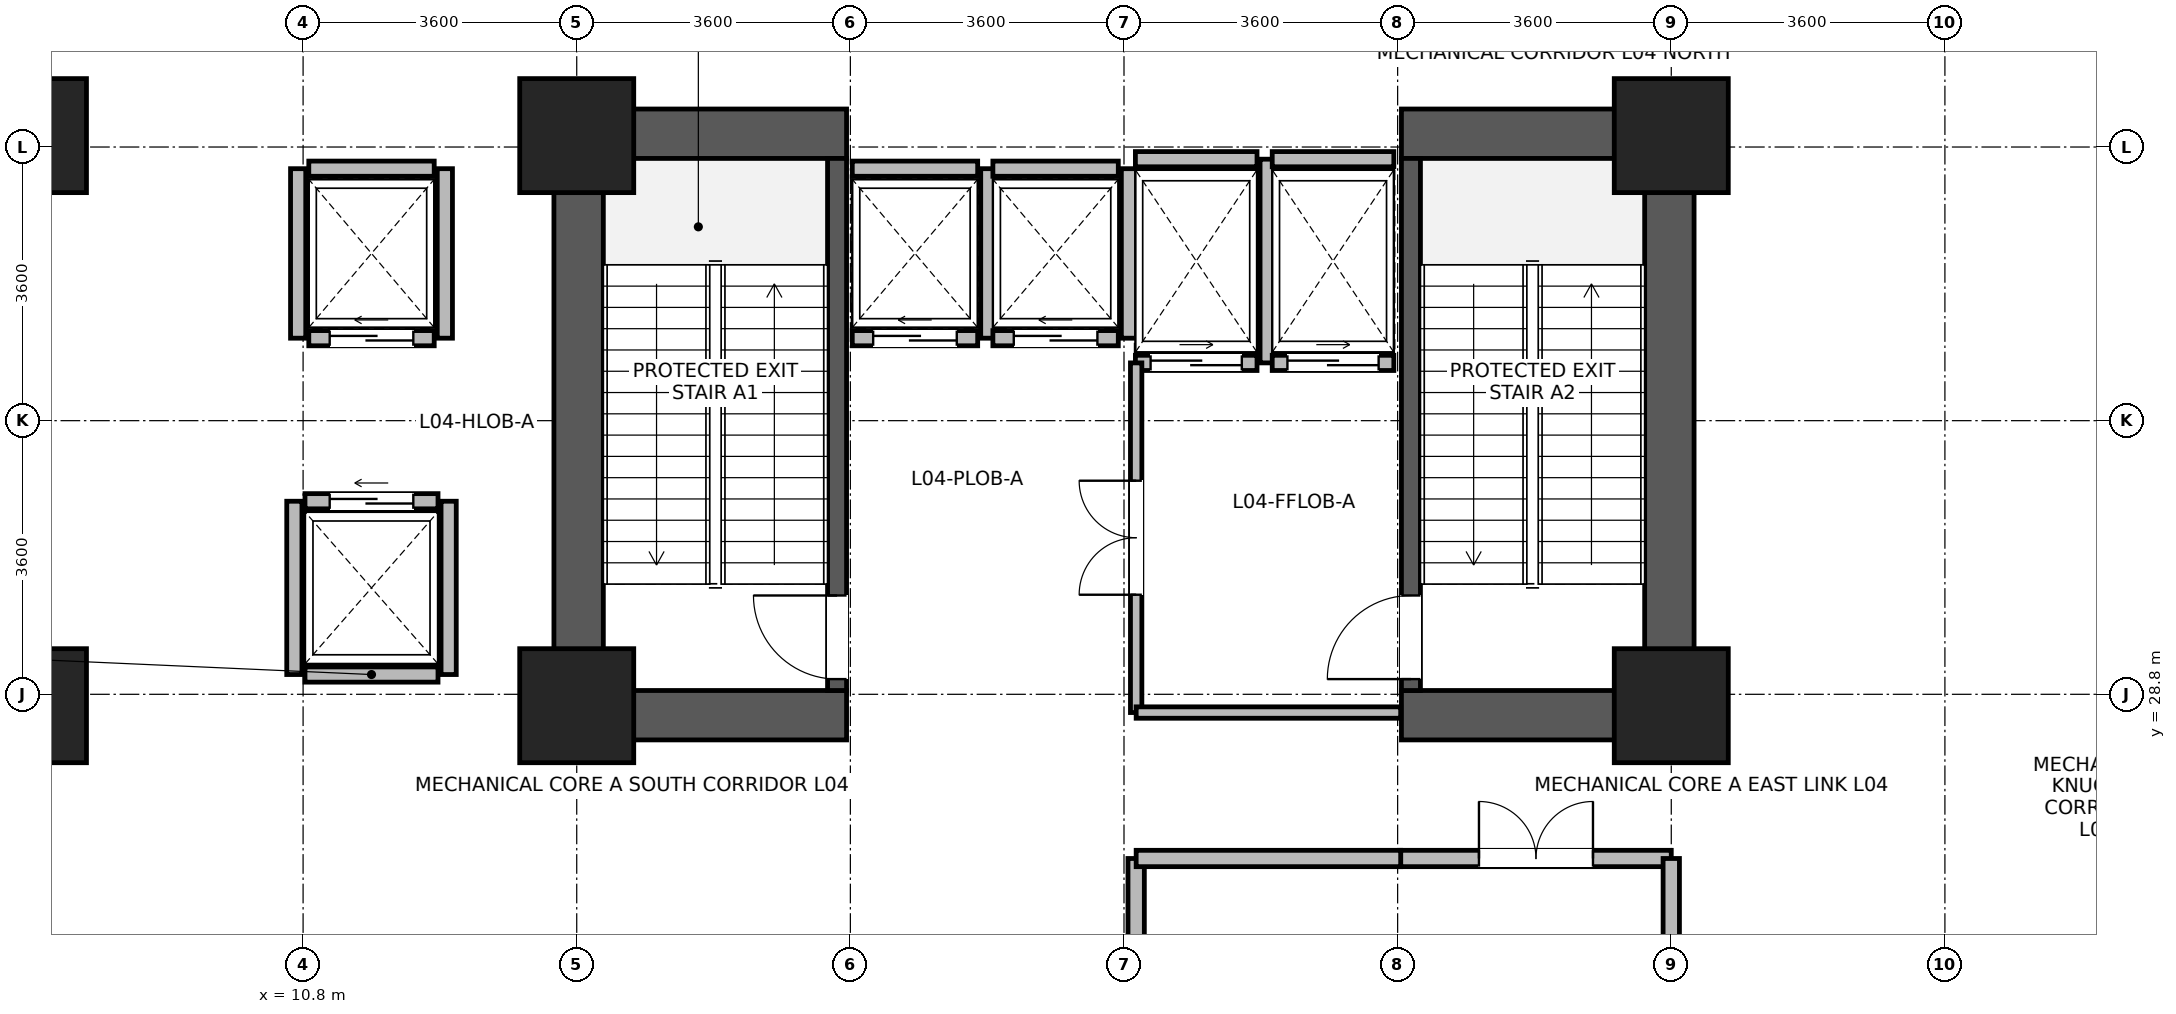
"""IFC4 building model, lengths in metres.
Left out: names, types, materials, properties, quantities, classifications, styles, units other than length and angle.
Written with IfcOpenShell. Run it as: python <this file> out.ifc"""

import sys

from ifc_helpers import new_model, si_unit, direction, frame, frame_2d, origin, origin_2d, place, context, subcontext, project, spatial, rectangle, extrude, source, transform, mapped, element, fill, save


model = new_model("IFC4")
c1 = context("Model", 3, precision=1e-05, world=origin(), true_north=direction((0.0, 1.0)))
c2 = subcontext(c1, "Body", "Model", "MODEL_VIEW")
j1 = project(units=[si_unit("LENGTHUNIT", "METRE"), si_unit("PLANEANGLEUNIT", "RADIAN")], contexts=[c1])
p1 = place(None, origin())
s1 = spatial("IfcSite", under=j1, at=p1, CompositionType="ELEMENT")
p2 = place(p1, origin())
s2 = spatial("IfcBuilding", under=s1, at=p2, CompositionType="ELEMENT")
p3 = place(p2, frame((0.0, 0.0, 19.8)))
s3 = spatial("IfcBuildingStorey", under=s2, at=p3, CompositionType="ELEMENT", Elevation=19.8)
for number, where, z_axis, x_axis in (
    (1, (14.425, 28.2, 0.0), (0.0, 0.0, 1.0), (0.0, 1.0, 0.0)),
    (2, (28.775, 28.2, 0.0), (0.0, 0.0, 1.0), (0.0, 1.0, 0.0)),
):
    element("IfcWall", number, at=place(p3, frame(where, z_axis=z_axis, x_axis=x_axis)), inside=s3, PredefinedType="SHEAR", context=c2, shape_type="SweptSolid", body=[
        extrude(rectangle(XDim=8.3, YDim=0.65, at=frame_2d((4.15, 0.0))), origin(), (0.0, 0.0, 1.0), 5.08),
    ])
for number, where, z_axis, x_axis in (
    (3, (14.75, 28.525, 0.0), (0.0, 0.0, 1.0), (1.0, 0.0, 0.0)),
    (4, (25.25, 28.525, 0.0), (0.0, 0.0, 1.0), (1.0, 0.0, 0.0)),
    (5, (14.75, 36.175, 0.0), (0.0, 0.0, 1.0), (1.0, 0.0, 0.0)),
    (6, (25.25, 36.175, 0.0), (0.0, 0.0, 1.0), (1.0, 0.0, 0.0)),
):
    element("IfcWall", number, at=place(p3, frame(where, z_axis=z_axis, x_axis=x_axis)), inside=s3, PredefinedType="SHEAR", context=c2, shape_type="SweptSolid", body=[
        extrude(rectangle(XDim=3.2, YDim=0.65, at=frame_2d((1.6, 0.0))), origin(), (0.0, 0.0, 1.0), 5.08),
    ])
p4 = place(p3, frame((17.825, 28.85, 0.0), z_axis=(0.0, 0.0, 1.0), x_axis=(0.0, 1.0, 0.0)))
e7 = element("IfcWall", 7, at=p4, inside=s3, PredefinedType="SHEAR", context=c2, shape_type="SweptSolid", body=[
    extrude(rectangle(XDim=7.0, YDim=0.25, at=frame_2d((3.5, 0.0))), origin(), (0.0, 0.0, 1.0), 5.08),
])
p5 = place(p4, frame((0.15, 0.0, 0.0)))
e8 = element("IfcOpeningElement", 8, at=p5, cuts=e7, PredefinedType="OPENING", context=c2, shape_type="SweptSolid", body=[
    extrude(rectangle(XDim=1.1, YDim=2.08, at=frame_2d((0.55, 1.04))), frame((0.0, 0.135, 0.0), z_axis=(0.0, -1.0, 0.0), x_axis=(1.0, 0.0, 0.0)), (0.0, 0.0, 1.0), 0.27),
])
p6 = place(p3, frame((25.375, 28.85, 0.0), z_axis=(0.0, 0.0, 1.0), x_axis=(0.0, 1.0, 0.0)))
e9 = element("IfcWall", 9, at=p6, inside=s3, PredefinedType="SHEAR", context=c2, shape_type="SweptSolid", body=[
    extrude(rectangle(XDim=7.0, YDim=0.25, at=frame_2d((3.5, 0.0))), origin(), (0.0, 0.0, 1.0), 5.08),
])
p7 = place(p6, frame((0.15, 0.0, 0.0)))
e10 = element("IfcOpeningElement", 10, at=p7, cuts=e9, PredefinedType="OPENING", context=c2, shape_type="SweptSolid", body=[
    extrude(rectangle(XDim=1.1, YDim=2.08, at=frame_2d((0.55, 1.04))), frame((0.0, 0.135, 0.0), z_axis=(0.0, -1.0, 0.0), x_axis=(1.0, 0.0, 0.0)), (0.0, 0.0, 1.0), 0.27),
])
m1 = source(origin(), c2, "Body", "SweptSolid", [
    extrude(rectangle(XDim=1.5, YDim=1.5, at=origin_2d()), origin(), (0.0, 0.0, 1.0), 5.5),
])
for number, where, z_axis, x_axis in (
    (11, (7.2, 28.65, 0.0), (0.0, 0.0, 1.0), (1.0, 0.0, 0.0)),
    (12, (7.2, 36.15, 0.0), (0.0, 0.0, 1.0), (1.0, 0.0, 0.0)),
    (13, (14.4, 28.65, 0.0), (0.0, 0.0, 1.0), (1.0, 0.0, 0.0)),
    (14, (14.4, 36.15, 0.0), (0.0, 0.0, 1.0), (1.0, 0.0, 0.0)),
    (15, (28.8, 28.65, 0.0), (0.0, 0.0, 1.0), (1.0, 0.0, 0.0)),
    (16, (28.8, 36.15, 0.0), (0.0, 0.0, 1.0), (1.0, 0.0, 0.0)),
):
    element("IfcColumn", number, at=place(p3, frame(where, z_axis=z_axis, x_axis=x_axis)), inside=s3, PredefinedType="COLUMN", context=c2, shape_type="MappedRepresentation", body=[
        mapped(m1, transform((0.0, 0.0, 0.0), x_axis=(1.0, 0.0, 0.0), y_axis=(0.0, 1.0, 0.0), z_axis=(0.0, 0.0, 1.0), scale=1.0)),
    ])
p8 = place(p3, frame((18.025, 33.485, 0.0), z_axis=(0.0, 0.0, 1.0), x_axis=(1.0, 0.0, 0.0)))
e17 = element("IfcWall", 17, at=p8, inside=s3, PredefinedType="PARTITIONING", context=c2, shape_type="SweptSolid", body=[
    extrude(rectangle(XDim=1.65, YDim=0.2, at=frame_2d((0.825, 0.0))), origin(), (0.0, 0.0, 1.0), 5.06),
])
p9 = place(p8, frame((0.275, 0.0, 0.0)))
e18 = element("IfcOpeningElement", 18, at=p9, cuts=e17, PredefinedType="OPENING", context=c2, shape_type="SweptSolid", body=[
    extrude(rectangle(XDim=1.1, YDim=2.12, at=frame_2d((0.55, 1.06))), frame((0.0, 0.11, 0.0), z_axis=(0.0, -1.0, 0.0), x_axis=(1.0, 0.0, 0.0)), (0.0, 0.0, 1.0), 0.22),
])
p10 = place(p3, frame((18.025, 35.715, 0.0), z_axis=(0.0, 0.0, 1.0), x_axis=(1.0, 0.0, 0.0)))
e19 = element("IfcWall", 19, at=p10, inside=s3, PredefinedType="PARTITIONING", context=c2, shape_type="SweptSolid", body=[
    extrude(rectangle(XDim=1.65, YDim=0.2, at=frame_2d((0.825, 0.0))), origin(), (0.0, 0.0, 1.0), 5.06),
])
p11 = place(p3, frame((19.815, 33.485, 0.0), z_axis=(0.0, 0.0, 1.0), x_axis=(0.0, 1.0, 0.0)))
e20 = element("IfcWall", 20, at=p11, inside=s3, PredefinedType="PARTITIONING", context=c2, shape_type="SweptSolid", body=[
    extrude(rectangle(XDim=2.23, YDim=0.2, at=frame_2d((1.115, 0.0))), origin(), (0.0, 0.0, 1.0), 5.06),
])
p12 = place(p3, frame((19.875, 33.485, 0.0), z_axis=(0.0, 0.0, 1.0), x_axis=(1.0, 0.0, 0.0)))
e21 = element("IfcWall", 21, at=p12, inside=s3, PredefinedType="PARTITIONING", context=c2, shape_type="SweptSolid", body=[
    extrude(rectangle(XDim=1.65, YDim=0.2, at=frame_2d((0.825, 0.0))), origin(), (0.0, 0.0, 1.0), 5.06),
])
p13 = place(p12, frame((0.275, 0.0, 0.0)))
e22 = element("IfcOpeningElement", 22, at=p13, cuts=e21, PredefinedType="OPENING", context=c2, shape_type="SweptSolid", body=[
    extrude(rectangle(XDim=1.1, YDim=2.12, at=frame_2d((0.55, 1.06))), frame((0.0, 0.11, 0.0), z_axis=(0.0, -1.0, 0.0), x_axis=(1.0, 0.0, 0.0)), (0.0, 0.0, 1.0), 0.22),
])
p14 = place(p3, frame((19.875, 35.715, 0.0), z_axis=(0.0, 0.0, 1.0), x_axis=(1.0, 0.0, 0.0)))
e23 = element("IfcWall", 23, at=p14, inside=s3, PredefinedType="PARTITIONING", context=c2, shape_type="SweptSolid", body=[
    extrude(rectangle(XDim=1.65, YDim=0.2, at=frame_2d((0.825, 0.0))), origin(), (0.0, 0.0, 1.0), 5.06),
])
p15 = place(p3, frame((21.665, 33.485, 0.0), z_axis=(0.0, 0.0, 1.0), x_axis=(0.0, 1.0, 0.0)))
e24 = element("IfcWall", 24, at=p15, inside=s3, PredefinedType="PARTITIONING", context=c2, shape_type="SweptSolid", body=[
    extrude(rectangle(XDim=2.23, YDim=0.2, at=frame_2d((1.115, 0.0))), origin(), (0.0, 0.0, 1.0), 5.06),
])
p16 = place(p3, frame((10.825, 29.06, 0.0), z_axis=(0.0, 0.0, 1.0), x_axis=(1.0, 0.0, 0.0)))
e25 = element("IfcWall", 25, at=p16, inside=s3, PredefinedType="PARTITIONING", context=c2, shape_type="SweptSolid", body=[
    extrude(rectangle(XDim=1.75, YDim=0.2, at=frame_2d((0.875, 0.0))), origin(), (0.0, 0.0, 1.0), 5.06),
])
p17 = place(p3, frame((10.825, 31.34, 0.0), z_axis=(0.0, 0.0, 1.0), x_axis=(1.0, 0.0, 0.0)))
e26 = element("IfcWall", 26, at=p17, inside=s3, PredefinedType="PARTITIONING", context=c2, shape_type="SweptSolid", body=[
    extrude(rectangle(XDim=1.75, YDim=0.2, at=frame_2d((0.875, 0.0))), origin(), (0.0, 0.0, 1.0), 5.06),
])
p18 = place(p17, frame((0.325, 0.0, 0.0)))
e27 = element("IfcOpeningElement", 27, at=p18, cuts=e26, PredefinedType="OPENING", context=c2, shape_type="SweptSolid", body=[
    extrude(rectangle(XDim=1.1, YDim=2.12, at=frame_2d((0.55, 1.06))), frame((0.0, 0.11, 0.0), z_axis=(0.0, -1.0, 0.0), x_axis=(1.0, 0.0, 0.0)), (0.0, 0.0, 1.0), 0.22),
])
for number, where, z_axis, x_axis in (
    (28, (10.685, 29.06, 0.0), (0.0, 0.0, 1.0), (0.0, 1.0, 0.0)),
    (29, (12.715, 29.06, 0.0), (0.0, 0.0, 1.0), (0.0, 1.0, 0.0)),
):
    element("IfcWall", number, at=place(p3, frame(where, z_axis=z_axis, x_axis=x_axis)), inside=s3, PredefinedType="PARTITIONING", context=c2, shape_type="SweptSolid", body=[
        extrude(rectangle(XDim=2.28, YDim=0.2, at=frame_2d((1.14, 0.0))), origin(), (0.0, 0.0, 1.0), 5.06),
    ])
p19 = place(p3, frame((10.875, 33.485, 0.0), z_axis=(0.0, 0.0, 1.0), x_axis=(1.0, 0.0, 0.0)))
e30 = element("IfcWall", 30, at=p19, inside=s3, PredefinedType="PARTITIONING", context=c2, shape_type="SweptSolid", body=[
    extrude(rectangle(XDim=1.65, YDim=0.2, at=frame_2d((0.825, 0.0))), origin(), (0.0, 0.0, 1.0), 5.06),
])
p20 = place(p19, frame((0.275, 0.0, 0.0)))
e31 = element("IfcOpeningElement", 31, at=p20, cuts=e30, PredefinedType="OPENING", context=c2, shape_type="SweptSolid", body=[
    extrude(rectangle(XDim=1.1, YDim=2.12, at=frame_2d((0.55, 1.06))), frame((0.0, 0.11, 0.0), z_axis=(0.0, -1.0, 0.0), x_axis=(1.0, 0.0, 0.0)), (0.0, 0.0, 1.0), 0.22),
])
p21 = place(p3, frame((10.875, 35.715, 0.0), z_axis=(0.0, 0.0, 1.0), x_axis=(1.0, 0.0, 0.0)))
e32 = element("IfcWall", 32, at=p21, inside=s3, PredefinedType="PARTITIONING", context=c2, shape_type="SweptSolid", body=[
    extrude(rectangle(XDim=1.65, YDim=0.2, at=frame_2d((0.825, 0.0))), origin(), (0.0, 0.0, 1.0), 5.06),
])
for number, where, z_axis, x_axis in (
    (33, (10.735, 33.485, 0.0), (0.0, 0.0, 1.0), (0.0, 1.0, 0.0)),
    (34, (12.665, 33.485, 0.0), (0.0, 0.0, 1.0), (0.0, 1.0, 0.0)),
):
    element("IfcWall", number, at=place(p3, frame(where, z_axis=z_axis, x_axis=x_axis)), inside=s3, PredefinedType="PARTITIONING", context=c2, shape_type="SweptSolid", body=[
        extrude(rectangle(XDim=2.23, YDim=0.2, at=frame_2d((1.115, 0.0))), origin(), (0.0, 0.0, 1.0), 5.06),
    ])
p22 = place(p3, frame((21.75, 33.16, 0.0), z_axis=(0.0, 0.0, 1.0), x_axis=(1.0, 0.0, 0.0)))
e35 = element("IfcWall", 35, at=p22, inside=s3, PredefinedType="PARTITIONING", context=c2, shape_type="SweptSolid", body=[
    extrude(rectangle(XDim=1.6, YDim=0.2, at=frame_2d((0.8, 0.0))), origin(), (0.0, 0.0, 1.0), 5.06),
])
p23 = place(p22, frame((0.2, 0.0, 0.0)))
e36 = element("IfcOpeningElement", 36, at=p23, cuts=e35, PredefinedType="OPENING", context=c2, shape_type="SweptSolid", body=[
    extrude(rectangle(XDim=1.2, YDim=2.12, at=frame_2d((0.6, 1.06))), frame((0.0, 0.11, 0.0), z_axis=(0.0, -1.0, 0.0), x_axis=(1.0, 0.0, 0.0)), (0.0, 0.0, 1.0), 0.22),
])
p24 = place(p3, frame((21.75, 35.84, 0.0), z_axis=(0.0, 0.0, 1.0), x_axis=(1.0, 0.0, 0.0)))
e37 = element("IfcWall", 37, at=p24, inside=s3, PredefinedType="PARTITIONING", context=c2, shape_type="SweptSolid", body=[
    extrude(rectangle(XDim=1.6, YDim=0.2, at=frame_2d((0.8, 0.0))), origin(), (0.0, 0.0, 1.0), 3.86),
])
p25 = place(p3, frame((23.49, 33.16, 0.0), z_axis=(0.0, 0.0, 1.0), x_axis=(0.0, 1.0, 0.0)))
e38 = element("IfcWall", 38, at=p25, inside=s3, PredefinedType="PARTITIONING", context=c2, shape_type="SweptSolid", body=[
    extrude(rectangle(XDim=2.68, YDim=0.2, at=frame_2d((1.34, 0.0))), origin(), (0.0, 0.0, 1.0), 5.06),
])
p26 = place(p3, frame((23.55, 33.16, 0.0), z_axis=(0.0, 0.0, 1.0), x_axis=(1.0, 0.0, 0.0)))
e39 = element("IfcWall", 39, at=p26, inside=s3, PredefinedType="PARTITIONING", context=c2, shape_type="SweptSolid", body=[
    extrude(rectangle(XDim=1.6, YDim=0.2, at=frame_2d((0.8, 0.0))), origin(), (0.0, 0.0, 1.0), 5.06),
])
p27 = place(p26, frame((0.2, 0.0, 0.0)))
e40 = element("IfcOpeningElement", 40, at=p27, cuts=e39, PredefinedType="OPENING", context=c2, shape_type="SweptSolid", body=[
    extrude(rectangle(XDim=1.2, YDim=2.12, at=frame_2d((0.6, 1.06))), frame((0.0, 0.11, 0.0), z_axis=(0.0, -1.0, 0.0), x_axis=(1.0, 0.0, 0.0)), (0.0, 0.0, 1.0), 0.22),
])
p28 = place(p3, frame((23.55, 35.84, 0.0), z_axis=(0.0, 0.0, 1.0), x_axis=(1.0, 0.0, 0.0)))
e41 = element("IfcWall", 41, at=p28, inside=s3, PredefinedType="PARTITIONING", context=c2, shape_type="SweptSolid", body=[
    extrude(rectangle(XDim=1.6, YDim=0.2, at=frame_2d((0.8, 0.0))), origin(), (0.0, 0.0, 1.0), 3.86),
])
p29 = place(p3, frame((25.24, 26.64, 0.0), z_axis=(0.0, 0.0, 1.0), x_axis=(1.0, 0.0, 0.0)))
e42 = element("IfcWall", 42, at=p29, inside=s3, PredefinedType="PARTITIONING", context=c2, shape_type="SweptSolid", body=[
    extrude(rectangle(XDim=3.56, YDim=0.215, at=frame_2d((1.78, 0.0))), origin(), (0.0, 0.0, 1.0), 5.06),
])
p30 = place(p29, frame((1.03, 0.0, 0.0)))
e43 = element("IfcOpeningElement", 43, at=p30, cuts=e42, PredefinedType="OPENING", context=c2, shape_type="SweptSolid", body=[
    extrude(rectangle(XDim=1.5, YDim=2.1, at=frame_2d((0.75, 1.05))), frame((0.0, 0.118, 0.0), z_axis=(0.0, -1.0, 0.0), x_axis=(1.0, 0.0, 0.0)), (0.0, 0.0, 1.0), 0.235),
])
p31 = place(p3, frame((21.76, 22.35, 0.0), z_axis=(0.0, 0.0, 1.0), x_axis=(0.0, 1.0, 0.0)))
e44 = element("IfcWall", 44, at=p31, inside=s3, PredefinedType="PARTITIONING", context=c2, shape_type="SweptSolid", body=[
    extrude(rectangle(XDim=4.29, YDim=0.215, at=frame_2d((2.145, 0.0))), origin(), (0.0, 0.0, 1.0), 3.46),
])
p32 = place(p3, frame((28.8, 22.35, 0.0), z_axis=(0.0, 0.0, 1.0), x_axis=(0.0, 1.0, 0.0)))
e45 = element("IfcWall", 45, at=p32, inside=s3, PredefinedType="PARTITIONING", context=c2, shape_type="SweptSolid", body=[
    extrude(rectangle(XDim=4.29, YDim=0.215, at=frame_2d((2.145, 0.0))), origin(), (0.0, 0.0, 1.0), 3.26),
])
p33 = place(p3, frame((21.76, 28.56, 0.0), z_axis=(0.0, 0.0, 1.0), x_axis=(0.0, 1.0, 0.0)))
e46 = element("IfcWall", 46, at=p33, inside=s3, PredefinedType="PARTITIONING", context=c2, shape_type="SweptSolid", body=[
    extrude(rectangle(XDim=4.6, YDim=0.15, at=frame_2d((2.3, 0.0))), origin(), (0.0, 0.0, 1.0), 5.06),
])
p34 = place(p33, frame((1.55, 0.0, 0.0)))
e47 = element("IfcOpeningElement", 47, at=p34, cuts=e46, PredefinedType="OPENING", context=c2, shape_type="SweptSolid", body=[
    extrude(rectangle(XDim=1.5, YDim=2.1, at=frame_2d((0.75, 1.05))), frame((0.0, 0.085, 0.0), z_axis=(0.0, -1.0, 0.0), x_axis=(1.0, 0.0, 0.0)), (0.0, 0.0, 1.0), 0.17),
])
p35 = place(p3, frame((21.76, 26.64, 0.0), z_axis=(0.0, 0.0, 1.0), x_axis=(1.0, 0.0, 0.0)))
e48 = element("IfcWall", 48, at=p35, inside=s3, PredefinedType="PARTITIONING", context=c2, shape_type="SweptSolid", body=[
    extrude(rectangle(XDim=3.48, YDim=0.215, at=frame_2d((1.74, 0.0))), origin(), (0.0, 0.0, 1.0), 5.06),
])
p36 = place(p3, frame((21.76, 28.56, 0.0), z_axis=(0.0, 0.0, 1.0), x_axis=(1.0, 0.0, 0.0)))
e49 = element("IfcWall", 49, at=p36, inside=s3, PredefinedType="PARTITIONING", context=c2, shape_type="SweptSolid", body=[
    extrude(rectangle(XDim=3.48, YDim=0.15, at=frame_2d((1.74, 0.0))), origin(), (0.0, 0.0, 1.0), 3.86),
])
p37 = place(p5, origin())
e50 = element("IfcDoor", 50, at=p37, inside=s3, OperationType="SINGLE_SWING_RIGHT", PredefinedType="DOOR", context=c2, shape_type="SweptSolid", body=[
    extrude(rectangle(XDim=1.1, YDim=2.08, at=frame_2d((0.55, 1.04))), frame((0.0, 0.025, 0.0), z_axis=(0.0, -1.0, 0.0), x_axis=(1.0, 0.0, 0.0)), (0.0, 0.0, 1.0), 0.05),
])
fill(e8, e50)
p38 = place(p7, origin())
e51 = element("IfcDoor", 51, at=p38, inside=s3, OperationType="SINGLE_SWING_LEFT", PredefinedType="DOOR", context=c2, shape_type="SweptSolid", body=[
    extrude(rectangle(XDim=1.1, YDim=2.08, at=frame_2d((0.55, 1.04))), frame((0.0, 0.025, 0.0), z_axis=(0.0, -1.0, 0.0), x_axis=(1.0, 0.0, 0.0)), (0.0, 0.0, 1.0), 0.05),
])
fill(e10, e51)
p39 = place(p9, origin())
e52 = element("IfcDoor", 52, at=p39, inside=s3, OperationType="SLIDING_TO_LEFT", PredefinedType="DOOR", context=c2, shape_type="SweptSolid", body=[
    extrude(rectangle(XDim=1.1, YDim=2.12, at=frame_2d((0.55, 1.06))), frame((0.0, 0.025, 0.0), z_axis=(0.0, -1.0, 0.0), x_axis=(1.0, 0.0, 0.0)), (0.0, 0.0, 1.0), 0.05),
])
fill(e18, e52)
p40 = place(p13, origin())
e53 = element("IfcDoor", 53, at=p40, inside=s3, OperationType="SLIDING_TO_LEFT", PredefinedType="DOOR", context=c2, shape_type="SweptSolid", body=[
    extrude(rectangle(XDim=1.1, YDim=2.12, at=frame_2d((0.55, 1.06))), frame((0.0, 0.025, 0.0), z_axis=(0.0, -1.0, 0.0), x_axis=(1.0, 0.0, 0.0)), (0.0, 0.0, 1.0), 0.05),
])
fill(e22, e53)
p41 = place(p18, origin())
e54 = element("IfcDoor", 54, at=p41, inside=s3, OperationType="SLIDING_TO_LEFT", PredefinedType="DOOR", context=c2, shape_type="SweptSolid", body=[
    extrude(rectangle(XDim=1.1, YDim=2.12, at=frame_2d((0.55, 1.06))), frame((0.0, 0.025, 0.0), z_axis=(0.0, -1.0, 0.0), x_axis=(1.0, 0.0, 0.0)), (0.0, 0.0, 1.0), 0.05),
])
fill(e27, e54)
p42 = place(p20, origin())
e55 = element("IfcDoor", 55, at=p42, inside=s3, OperationType="SLIDING_TO_LEFT", PredefinedType="DOOR", context=c2, shape_type="SweptSolid", body=[
    extrude(rectangle(XDim=1.1, YDim=2.12, at=frame_2d((0.55, 1.06))), frame((0.0, 0.025, 0.0), z_axis=(0.0, -1.0, 0.0), x_axis=(1.0, 0.0, 0.0)), (0.0, 0.0, 1.0), 0.05),
])
fill(e31, e55)
p43 = place(p23, origin())
e56 = element("IfcDoor", 56, at=p43, inside=s3, OperationType="SLIDING_TO_RIGHT", PredefinedType="DOOR", context=c2, shape_type="SweptSolid", body=[
    extrude(rectangle(XDim=1.2, YDim=2.12, at=frame_2d((0.6, 1.06))), frame((0.0, 0.025, 0.0), z_axis=(0.0, -1.0, 0.0), x_axis=(1.0, 0.0, 0.0)), (0.0, 0.0, 1.0), 0.05),
])
fill(e36, e56)
p44 = place(p27, origin())
e57 = element("IfcDoor", 57, at=p44, inside=s3, OperationType="SLIDING_TO_RIGHT", PredefinedType="DOOR", context=c2, shape_type="SweptSolid", body=[
    extrude(rectangle(XDim=1.2, YDim=2.12, at=frame_2d((0.6, 1.06))), frame((0.0, 0.025, 0.0), z_axis=(0.0, -1.0, 0.0), x_axis=(1.0, 0.0, 0.0)), (0.0, 0.0, 1.0), 0.05),
])
fill(e40, e57)
p45 = place(p30, origin())
e58 = element("IfcDoor", 58, at=p45, inside=s3, OperationType="DOUBLE_DOOR_SINGLE_SWING", PredefinedType="DOOR", context=c2, shape_type="SweptSolid", body=[
    extrude(rectangle(XDim=1.5, YDim=2.1, at=frame_2d((0.75, 1.05))), frame((0.0, 0.025, 0.0), z_axis=(0.0, -1.0, 0.0), x_axis=(1.0, 0.0, 0.0)), (0.0, 0.0, 1.0), 0.05),
])
fill(e43, e58)
p46 = place(p34, origin())
e59 = element("IfcDoor", 59, at=p46, inside=s3, OperationType="DOUBLE_DOOR_SINGLE_SWING", PredefinedType="DOOR", context=c2, shape_type="SweptSolid", body=[
    extrude(rectangle(XDim=1.5, YDim=2.1, at=frame_2d((0.75, 1.05))), frame((0.0, 0.025, 0.0), z_axis=(0.0, -1.0, 0.0), x_axis=(1.0, 0.0, 0.0)), (0.0, 0.0, 1.0), 0.05),
])
fill(e47, e59)
save(model, sys.argv[1])
